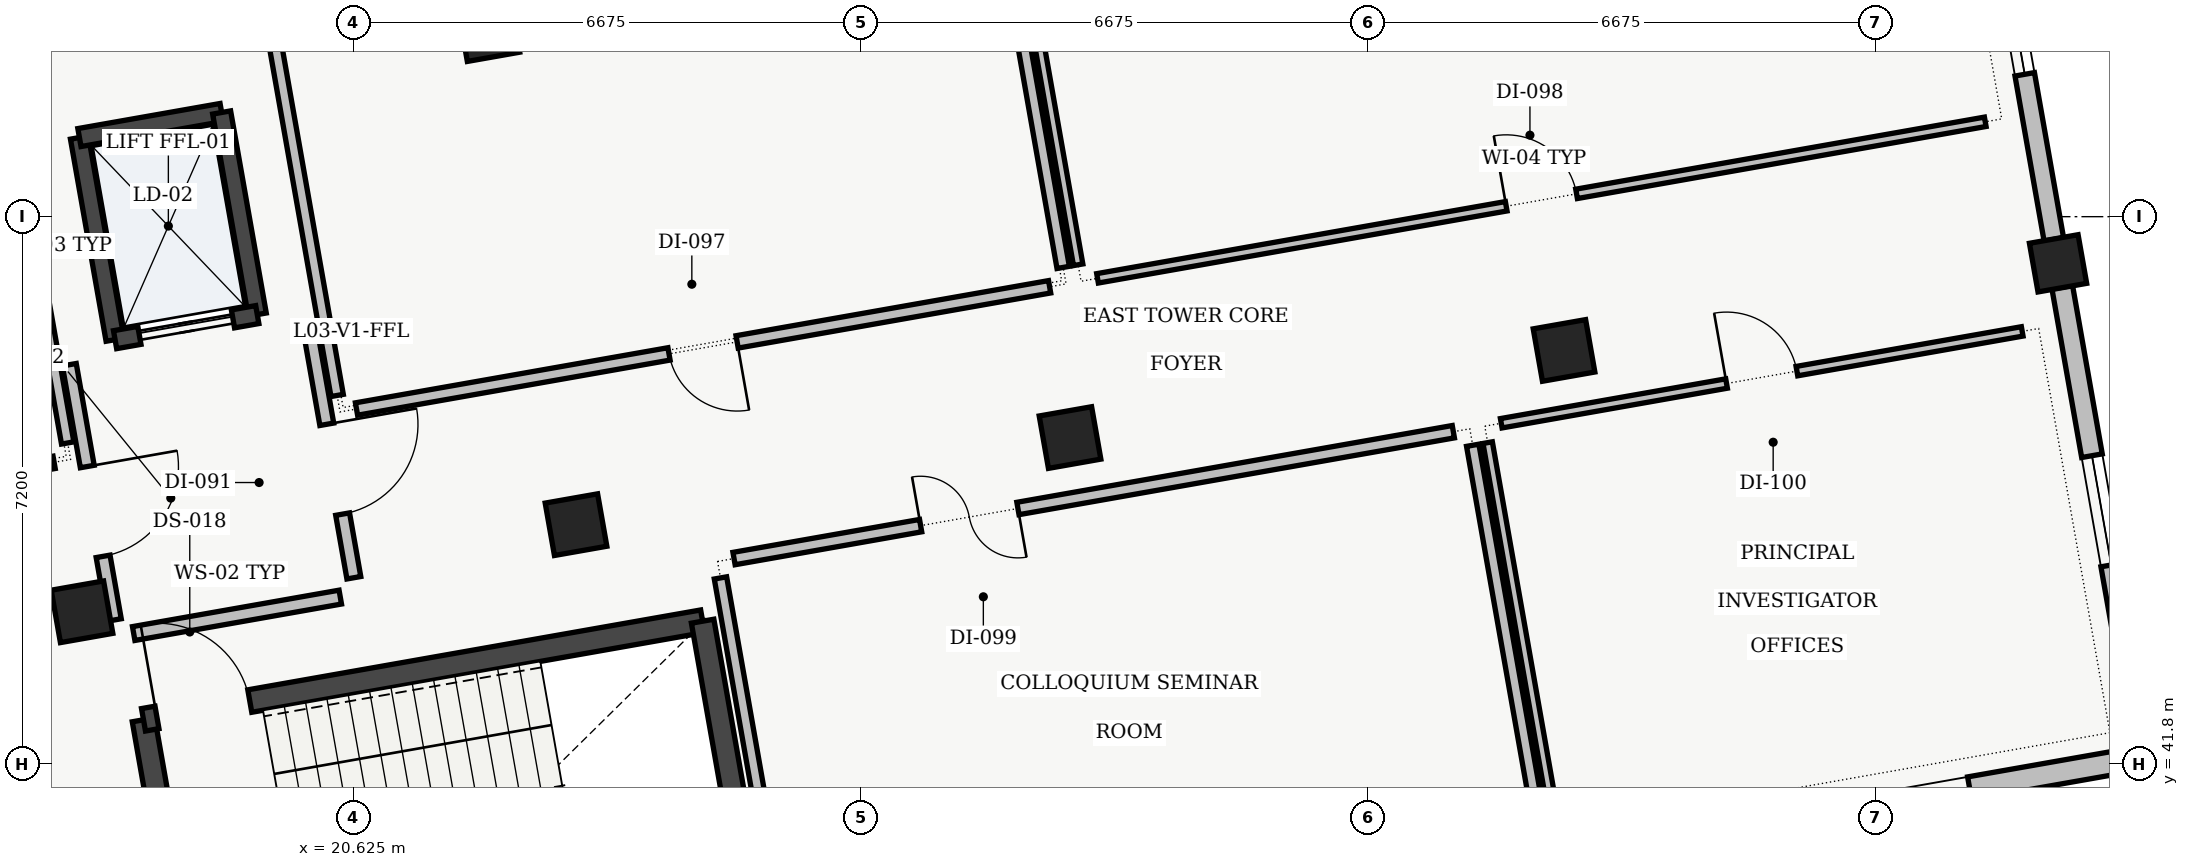
"""IFC4 building model, lengths in metres.
Left out: names, types, materials, properties, quantities, classifications, styles, units other than length and angle.
Written with IfcOpenShell. Run it as: python <this file> out.ifc"""

import sys

from ifc_helpers import new_model, si_unit, direction, frame, frame_2d, origin, origin_2d, place, context, subcontext, project, spatial, rectangle, extrude, element, fill, save


model = new_model("IFC4")
c1 = context("Model", 3, precision=1e-05, world=origin(), true_north=direction((0.0, 1.0)))
c2 = subcontext(c1, "Body", "Model", "MODEL_VIEW")
j1 = project(units=[si_unit("LENGTHUNIT", "METRE"), si_unit("PLANEANGLEUNIT", "RADIAN")], contexts=[c1])
p1 = place(None, origin())
s1 = spatial("IfcSite", under=j1, at=p1, CompositionType="ELEMENT")
p2 = place(p1, origin())
s2 = spatial("IfcBuilding", under=s1, at=p2, CompositionType="ELEMENT")
p3 = place(p2, frame((0.0, 0.0, 14.1)))
s3 = spatial("IfcBuildingStorey", under=s2, at=p3, CompositionType="ELEMENT", Elevation=14.1)
for number, where, z_axis, x_axis in (
    (1, (17.053, 43.802, 0.0), (0.0, 0.0, 1.0), (0.985, 0.174, 0.0)),
    (2, (23.553, 44.948, 0.0), (0.0, 0.0, 1.0), (0.985, 0.174, 0.0)),
    (3, (22.407, 51.448, 0.0), (0.0, 0.0, 1.0), (0.985, 0.174, 0.0)),
    (4, (30.053, 46.094, 0.0), (0.0, 0.0, 1.0), (0.985, 0.174, 0.0)),
    (5, (36.552, 47.24, 0.0), (0.0, 0.0, 1.0), (0.985, 0.174, 0.0)),
):
    element("IfcColumn", number, at=place(p3, frame(where, z_axis=z_axis, x_axis=x_axis)), inside=s3, PredefinedType="COLUMN", context=c2, shape_type="SweptSolid", body=[
        extrude(rectangle(XDim=0.7, YDim=0.7, at=origin_2d()), origin(), (0.0, 0.0, 1.0), 4.31),
    ])
p4 = place(p3, frame((43.052, 48.386, 0.0), z_axis=(0.0, 0.0, 1.0), x_axis=(0.984807753012, 0.173648177667, 0.0)))
e6 = element("IfcColumn", 6, at=p4, inside=s3, PredefinedType="COLUMN", context=c2, shape_type="SweptSolid", body=[
    extrude(rectangle(XDim=0.65, YDim=0.65, at=origin_2d()), origin(), (0.0, 0.0, 1.0), 4.31),
])
p5 = place(p3, frame((41.962, 54.571, 0.0), z_axis=(0.0, 0.0, 1.0), x_axis=(0.173645120828, -0.98480829201, 0.0)))
e7 = element("IfcWall", 7, at=p5, inside=s3, PredefinedType="STANDARD", context=c2, shape_type="SweptSolid", body=[
    extrude(rectangle(XDim=5.96, YDim=0.26, at=frame_2d((2.98, 0.0))), origin(), (0.0, 0.0, 1.0), 3.795),
])
p6 = place(p5, frame((2.205, 0.0, 0.95)))
e8 = element("IfcOpeningElement", 8, at=p6, cuts=e7, PredefinedType="OPENING", context=c2, shape_type="SweptSolid", body=[
    extrude(rectangle(XDim=1.55, YDim=1.46, at=frame_2d((0.775, 0.73))), frame((0.0, 0.13, 0.0), z_axis=(0.0, -1.0, 0.0), x_axis=(1.0, 0.0, 0.0)), (0.0, 0.0, 1.0), 0.26),
])
p7 = place(p3, frame((43.108, 48.071, 0.0), z_axis=(0.0, 0.0, 1.0), x_axis=(0.173645120828, -0.98480829201, 0.0)))
e9 = element("IfcWall", 9, at=p7, inside=s3, PredefinedType="STANDARD", context=c2, shape_type="SweptSolid", body=[
    extrude(rectangle(XDim=5.96, YDim=0.275, at=frame_2d((2.98, 0.0))), origin(), (0.0, 0.0, 1.0), 3.795),
])
p8 = place(p7, frame((2.25, 0.0, 0.95)))
e10 = element("IfcOpeningElement", 10, at=p8, cuts=e9, PredefinedType="OPENING", context=c2, shape_type="SweptSolid", body=[
    extrude(rectangle(XDim=1.46, YDim=1.44, at=frame_2d((0.73, 0.72))), frame((0.0, 0.137, 0.0), z_axis=(0.0, -1.0, 0.0), x_axis=(1.0, 0.0, 0.0)), (0.0, 0.0, 1.0), 0.275),
])
p9 = place(p3, frame((43.883, 41.831, 0.0), z_axis=(0.0, 0.0, 1.0), x_axis=(-0.98480829201, -0.173645120828, 0.0)))
e11 = element("IfcWall", 11, at=p9, inside=s3, PredefinedType="STANDARD", context=c2, shape_type="SweptSolid", body=[
    extrude(rectangle(XDim=5.96, YDim=0.305, at=frame_2d((2.98, 0.0))), origin(), (0.0, 0.0, 1.0), 3.795),
])
p10 = place(p9, frame((2.025, 0.0, 0.95)))
e12 = element("IfcOpeningElement", 12, at=p10, cuts=e11, PredefinedType="OPENING", context=c2, shape_type="SweptSolid", body=[
    extrude(rectangle(XDim=1.91, YDim=1.4, at=frame_2d((0.955, 0.7))), frame((0.0, 0.152, 0.0), z_axis=(0.0, -1.0, 0.0), x_axis=(1.0, 0.0, 0.0)), (0.0, 0.0, 1.0), 0.305),
])
p11 = place(p3, frame((18.567, 38.383, 0.0), z_axis=(0.0, 0.0, 1.0), x_axis=(-0.173606946886, 0.984815022221, 0.0)))
e13 = element("IfcWall", 13, at=p11, inside=s3, PredefinedType="SHEAR", context=c2, shape_type="SweptSolid", body=[
    extrude(rectangle(XDim=4.06, YDim=0.3, at=frame_2d((2.03, 0.0))), origin(), (0.0, 0.0, 1.0), 4.28),
])
p12 = place(p3, frame((17.863, 42.381, 0.0), z_axis=(0.0, 0.0, 1.0), x_axis=(0.984808225754, 0.173645496596, 0.0)))
e14 = element("IfcWall", 14, at=p12, inside=s3, PredefinedType="SHEAR", context=c2, shape_type="SweptSolid", body=[
    extrude(rectangle(XDim=7.47, YDim=0.3, at=frame_2d((3.735, 0.0))), origin(), (0.0, 0.0, 1.0), 4.28),
])
p13 = place(p12, frame((0.18, 0.0, 0.0)))
e15 = element("IfcOpeningElement", 15, at=p13, cuts=e14, PredefinedType="OPENING", context=c2, shape_type="SweptSolid", body=[
    extrude(rectangle(XDim=1.24, YDim=2.15, at=frame_2d((0.62, 1.075))), frame((0.0, 0.15, 0.0), z_axis=(0.0, -1.0, 0.0), x_axis=(1.0, 0.0, 0.0)), (0.0, 0.0, 1.0), 0.3),
])
p14 = place(p3, frame((25.219, 43.678, 0.0), z_axis=(0.0, 0.0, 1.0), x_axis=(0.173665267602, -0.984804739443, 0.0)))
e16 = element("IfcWall", 16, at=p14, inside=s3, PredefinedType="SHEAR", context=c2, shape_type="SweptSolid", body=[
    extrude(rectangle(XDim=4.06, YDim=0.3, at=frame_2d((2.03, 0.0))), origin(), (0.0, 0.0, 1.0), 4.28),
])
p15 = place(p3, frame((17.488, 47.382, 0.0), z_axis=(0.0, 0.0, 1.0), x_axis=(-0.173615102578, 0.98481358447, 0.0)))
e17 = element("IfcWall", 17, at=p15, inside=s3, PredefinedType="SHEAR", context=c2, shape_type="SweptSolid", body=[
    extrude(rectangle(XDim=2.7, YDim=0.24, at=frame_2d((1.35, 0.0))), origin(), (0.0, 0.0, 1.0), 4.28),
])
p16 = place(p3, frame((17.02, 50.041, 0.0), z_axis=(0.0, 0.0, 1.0), x_axis=(0.984815882103, 0.173602068988, 0.0)))
e18 = element("IfcWall", 18, at=p16, inside=s3, PredefinedType="SHEAR", context=c2, shape_type="SweptSolid", body=[
    extrude(rectangle(XDim=1.9, YDim=0.24, at=frame_2d((0.95, 0.0))), origin(), (0.0, 0.0, 1.0), 4.28),
])
p17 = place(p3, frame((18.891, 50.371, 0.0), z_axis=(0.0, 0.0, 1.0), x_axis=(0.173615102578, -0.98481358447, 0.0)))
e19 = element("IfcWall", 19, at=p17, inside=s3, PredefinedType="SHEAR", context=c2, shape_type="SweptSolid", body=[
    extrude(rectangle(XDim=2.7, YDim=0.24, at=frame_2d((1.35, 0.0))), origin(), (0.0, 0.0, 1.0), 4.28),
])
p18 = place(p3, frame((19.359, 47.712, 0.0), z_axis=(0.0, 0.0, 1.0), x_axis=(-0.984815882103, -0.173602068988, 0.0)))
e20 = element("IfcWall", 20, at=p18, inside=s3, PredefinedType="SHEAR", context=c2, shape_type="SweptSolid", body=[
    extrude(rectangle(XDim=1.9, YDim=0.24, at=frame_2d((0.95, 0.0))), origin(), (0.0, 0.0, 1.0), 4.28),
])
p19 = place(p18, frame((0.325, 0.0, 0.0)))
e21 = element("IfcOpeningElement", 21, at=p19, cuts=e20, PredefinedType="OPENING", context=c2, shape_type="SweptSolid", body=[
    extrude(rectangle(XDim=1.25, YDim=2.2, at=frame_2d((0.625, 1.1))), frame((0.0, 0.12, 0.0), z_axis=(0.0, -1.0, 0.0), x_axis=(1.0, 0.0, 0.0)), (0.0, 0.0, 1.0), 0.24),
])
p20 = place(p3, frame((17.733, 43.516, 0.0), z_axis=(0.0, 0.0, 1.0), x_axis=(0.984808483292, 0.173644035992, 0.0)))
e22 = element("IfcWall", 22, at=p20, inside=s3, PredefinedType="SOLIDWALL", context=c2, shape_type="SweptSolid", body=[
    extrude(rectangle(XDim=2.76, YDim=0.185, at=frame_2d((1.38, 0.0))), origin(), (0.0, 0.0, 1.0), 3.95),
])
p21 = place(p3, frame((20.63, 44.25, 0.0), z_axis=(0.0, 0.0, 1.0), x_axis=(-0.173621956536, 0.984812376145, 0.0)))
e23 = element("IfcWall", 23, at=p21, inside=s3, PredefinedType="SOLIDWALL", context=c2, shape_type="SweptSolid", body=[
    extrude(rectangle(XDim=3.41, YDim=0.185, at=frame_2d((1.705, 0.0))), origin(), (0.0, 0.0, 1.0), 3.95),
])
p22 = place(p21, frame((0.85, 0.0, 0.0)))
e24 = element("IfcOpeningElement", 24, at=p22, cuts=e23, PredefinedType="OPENING", context=c2, shape_type="SweptSolid", body=[
    extrude(rectangle(XDim=1.2, YDim=2.15, at=frame_2d((0.6, 1.075))), frame((0.0, 0.093, 0.0), z_axis=(0.0, -1.0, 0.0), x_axis=(1.0, 0.0, 0.0)), (0.0, 0.0, 1.0), 0.185),
])
p23 = place(p3, frame((16.886, 47.052, 0.0), z_axis=(0.0, 0.0, 1.0), x_axis=(0.173621956536, -0.984812376145, 0.0)))
e25 = element("IfcWall", 25, at=p23, inside=s3, PredefinedType="SOLIDWALL", context=c2, shape_type="SweptSolid", body=[
    extrude(rectangle(XDim=3.41, YDim=0.185, at=frame_2d((1.705, 0.0))), origin(), (0.0, 0.0, 1.0), 3.95),
])
p24 = place(p23, frame((1.36, 0.0, 0.0)))
e26 = element("IfcOpeningElement", 26, at=p24, cuts=e25, PredefinedType="OPENING", context=c2, shape_type="SweptSolid", body=[
    extrude(rectangle(XDim=1.2, YDim=2.15, at=frame_2d((0.6, 1.075))), frame((0.0, 0.093, 0.0), z_axis=(0.0, -1.0, 0.0), x_axis=(1.0, 0.0, 0.0)), (0.0, 0.0, 1.0), 0.185),
])
p25 = place(p3, frame((12.59, 45.046, 0.0), z_axis=(0.0, 0.0, 1.0), x_axis=(0.984805411783, 0.173661454915, 0.0)))
e27 = element("IfcWall", 27, at=p25, inside=s3, PredefinedType="PARTITIONING", context=c2, shape_type="SweptSolid", body=[
    extrude(rectangle(XDim=4.16, YDim=0.165, at=frame_2d((2.08, 0.0))), origin(), (0.0, 0.0, 1.0), 3.895),
])
p26 = place(p25, frame((1.28, 0.0, 0.0)))
e28 = element("IfcOpeningElement", 28, at=p26, cuts=e27, PredefinedType="OPENING", context=c2, shape_type="SweptSolid", body=[
    extrude(rectangle(XDim=1.6, YDim=2.06, at=frame_2d((0.8, 1.03))), frame((0.0, 0.083, 0.0), z_axis=(0.0, -1.0, 0.0), x_axis=(1.0, 0.0, 0.0)), (0.0, 0.0, 1.0), 0.165),
])
p27 = place(p3, frame((16.865, 46.023, 0.0), z_axis=(0.0, 0.0, 1.0), x_axis=(-0.173632075677, 0.984810592092, 0.0)))
e29 = element("IfcWall", 29, at=p27, inside=s3, PredefinedType="PARTITIONING", context=c2, shape_type="SweptSolid", body=[
    extrude(rectangle(XDim=10.36, YDim=0.165, at=frame_2d((5.18, 0.0))), origin(), (0.0, 0.0, 1.0), 3.695),
])
p28 = place(p3, frame((20.665, 46.469, 0.0), z_axis=(0.0, 0.0, 1.0), x_axis=(0.984804784872, 0.173665009985, 0.0)))
e30 = element("IfcWall", 30, at=p28, inside=s3, PredefinedType="PARTITIONING", context=c2, shape_type="SweptSolid", body=[
    extrude(rectangle(XDim=9.26, YDim=0.165, at=frame_2d((4.63, 0.0))), origin(), (0.0, 0.0, 1.0), 3.895),
])
p29 = place(p28, frame((4.175, 0.0, 0.0)))
e31 = element("IfcOpeningElement", 31, at=p29, cuts=e30, PredefinedType="OPENING", context=c2, shape_type="SweptSolid", body=[
    extrude(rectangle(XDim=0.91, YDim=2.08, at=frame_2d((0.455, 1.04))), frame((0.0, 0.083, 0.0), z_axis=(0.0, -1.0, 0.0), x_axis=(1.0, 0.0, 0.0)), (0.0, 0.0, 1.0), 0.165),
])
p30 = place(p3, frame((29.963, 48.333, 0.0), z_axis=(0.0, 0.0, 1.0), x_axis=(-0.173658960975, 0.984805851563, 0.0)))
e32 = element("IfcWall", 32, at=p30, inside=s3, PredefinedType="PARTITIONING", context=c2, shape_type="SweptSolid", body=[
    extrude(rectangle(XDim=10.36, YDim=0.165, at=frame_2d((5.18, 0.0))), origin(), (0.0, 0.0, 1.0), 3.695),
])
p31 = place(p3, frame((18.611, 56.851, 0.0), z_axis=(0.0, 0.0, 1.0), x_axis=(0.173654930775, -0.984806562233, 0.0)))
e33 = element("IfcWall", 33, at=p31, inside=s3, PredefinedType="PARTITIONING", context=c2, shape_type="SweptSolid", body=[
    extrude(rectangle(XDim=10.36, YDim=0.165, at=frame_2d((5.18, 0.0))), origin(), (0.0, 0.0, 1.0), 3.95),
])
p32 = place(p3, frame((30.415, 48.189, 0.0), z_axis=(0.0, 0.0, 1.0), x_axis=(0.984810073067, 0.173635019467, 0.0)))
e34 = element("IfcWall", 34, at=p32, inside=s3, PredefinedType="PARTITIONING", context=c2, shape_type="SweptSolid", body=[
    extrude(rectangle(XDim=11.86, YDim=0.125, at=frame_2d((5.93, 0.0))), origin(), (0.0, 0.0, 1.0), 3.95),
])
p33 = place(p32, frame((5.46, 0.0, 0.0)))
e35 = element("IfcOpeningElement", 35, at=p33, cuts=e34, PredefinedType="OPENING", context=c2, shape_type="SweptSolid", body=[
    extrude(rectangle(XDim=0.94, YDim=2.12, at=frame_2d((0.47, 1.06))), frame((0.0, 0.062, 0.0), z_axis=(0.0, -1.0, 0.0), x_axis=(1.0, 0.0, 0.0)), (0.0, 0.0, 1.0), 0.125),
])
p34 = place(p3, frame((28.361, 58.57, 0.0), z_axis=(0.0, 0.0, 1.0), x_axis=(0.173632075677, -0.984810592092, 0.0)))
e36 = element("IfcWall", 36, at=p34, inside=s3, PredefinedType="PARTITIONING", context=c2, shape_type="SweptSolid", body=[
    extrude(rectangle(XDim=10.36, YDim=0.125, at=frame_2d((5.18, 0.0))), origin(), (0.0, 0.0, 1.0), 3.95),
])
p35 = place(p3, frame((36.212, 41.108, 0.0), z_axis=(0.0, 0.0, 1.0), x_axis=(-0.173611232021, 0.984814266812, 0.0)))
e37 = element("IfcWall", 37, at=p35, inside=s3, PredefinedType="PARTITIONING", context=c2, shape_type="SweptSolid", body=[
    extrude(rectangle(XDim=4.96, YDim=0.165, at=frame_2d((2.48, 0.0))), origin(), (0.0, 0.0, 1.0), 3.95),
])
p36 = place(p3, frame((35.096, 46.171, 0.0), z_axis=(0.0, 0.0, 1.0), x_axis=(-0.98480912325, -0.173640406486, 0.0)))
e38 = element("IfcWall", 38, at=p36, inside=s3, PredefinedType="PARTITIONING", context=c2, shape_type="SweptSolid", body=[
    extrude(rectangle(XDim=9.61, YDim=0.165, at=frame_2d((4.805, 0.0))), origin(), (0.0, 0.0, 1.0), 3.95),
])
p37 = place(p36, frame((5.817, 0.0, 0.0)))
e39 = element("IfcOpeningElement", 39, at=p37, cuts=e38, PredefinedType="OPENING", context=c2, shape_type="SweptSolid", body=[
    extrude(rectangle(XDim=1.3, YDim=2.18, at=frame_2d((0.65, 1.09))), frame((0.0, 0.083, 0.0), z_axis=(0.0, -1.0, 0.0), x_axis=(1.0, 0.0, 0.0)), (0.0, 0.0, 1.0), 0.165),
])
p38 = place(p3, frame((25.454, 44.247, 0.0), z_axis=(0.0, 0.0, 1.0), x_axis=(0.173658971256, -0.98480584975, 0.0)))
e40 = element("IfcWall", 40, at=p38, inside=s3, PredefinedType="PARTITIONING", context=c2, shape_type="SweptSolid", body=[
    extrude(rectangle(XDim=4.96, YDim=0.165, at=frame_2d((2.48, 0.0))), origin(), (0.0, 0.0, 1.0), 3.95),
])
p39 = place(p3, frame((42.581, 47.491, 0.0), z_axis=(0.0, 0.0, 1.0), x_axis=(-0.984804033539, -0.173669270527, 0.0)))
e41 = element("IfcWall", 41, at=p39, inside=s3, PredefinedType="PARTITIONING", context=c2, shape_type="SweptSolid", body=[
    extrude(rectangle(XDim=6.96, YDim=0.125, at=frame_2d((3.48, 0.0))), origin(), (0.0, 0.0, 1.0), 3.95),
])
p40 = place(p39, frame((3.01, 0.0, 0.0)))
e42 = element("IfcOpeningElement", 42, at=p40, cuts=e41, PredefinedType="OPENING", context=c2, shape_type="SweptSolid", body=[
    extrude(rectangle(XDim=0.94, YDim=2.12, at=frame_2d((0.47, 1.06))), frame((0.0, 0.062, 0.0), z_axis=(0.0, -1.0, 0.0), x_axis=(1.0, 0.0, 0.0)), (0.0, 0.0, 1.0), 0.125),
])
p41 = place(p3, frame((35.548, 46.027, 0.0), z_axis=(0.0, 0.0, 1.0), x_axis=(0.173650553511, -0.984807334084, 0.0)))
e43 = element("IfcWall", 43, at=p41, inside=s3, PredefinedType="PARTITIONING", context=c2, shape_type="SweptSolid", body=[
    extrude(rectangle(XDim=4.96, YDim=0.125, at=frame_2d((2.48, 0.0))), origin(), (0.0, 0.0, 1.0), 3.95),
])
p42 = place(p6, origin())
e44 = element("IfcWindow", 44, at=p42, inside=s3, PartitioningType="SINGLE_PANEL", PredefinedType="WINDOW", context=c2, shape_type="SweptSolid", body=[
    extrude(rectangle(XDim=1.55, YDim=1.46, at=frame_2d((0.775, 0.73))), frame((0.0, 0.03, 0.0), z_axis=(0.0, -1.0, 0.0), x_axis=(1.0, 0.0, 0.0)), (0.0, 0.0, 1.0), 0.06),
])
fill(e8, e44)
p43 = place(p8, origin())
e45 = element("IfcWindow", 45, at=p43, inside=s3, PartitioningType="SINGLE_PANEL", PredefinedType="WINDOW", context=c2, shape_type="SweptSolid", body=[
    extrude(rectangle(XDim=1.46, YDim=1.44, at=frame_2d((0.73, 0.72))), frame((0.0, 0.03, 0.0), z_axis=(0.0, -1.0, 0.0), x_axis=(1.0, 0.0, 0.0)), (0.0, 0.0, 1.0), 0.06),
])
fill(e10, e45)
p44 = place(p10, origin())
e46 = element("IfcWindow", 46, at=p44, inside=s3, PartitioningType="SINGLE_PANEL", PredefinedType="WINDOW", context=c2, shape_type="SweptSolid", body=[
    extrude(rectangle(XDim=1.91, YDim=1.4, at=frame_2d((0.955, 0.7))), frame((0.0, 0.03, 0.0), z_axis=(0.0, -1.0, 0.0), x_axis=(1.0, 0.0, 0.0)), (0.0, 0.0, 1.0), 0.06),
])
fill(e12, e46)
p45 = place(p13, origin())
e47 = element("IfcDoor", 47, at=p45, inside=s3, OperationType="SINGLE_SWING_LEFT", PredefinedType="DOOR", context=c2, shape_type="SweptSolid", body=[
    extrude(rectangle(XDim=1.24, YDim=2.15, at=frame_2d((0.62, 1.075))), frame((0.0, 0.025, 0.0), z_axis=(0.0, -1.0, 0.0), x_axis=(1.0, 0.0, 0.0)), (0.0, 0.0, 1.0), 0.05),
])
fill(e15, e47)
p46 = place(p19, origin())
e48 = element("IfcDoor", 48, at=p46, inside=s3, OperationType="SLIDING_TO_RIGHT", PredefinedType="DOOR", context=c2, shape_type="SweptSolid", body=[
    extrude(rectangle(XDim=1.25, YDim=2.2, at=frame_2d((0.625, 1.1))), frame((0.0, 0.025, 0.0), z_axis=(0.0, -1.0, 0.0), x_axis=(1.0, 0.0, 0.0)), (0.0, 0.0, 1.0), 0.05),
])
fill(e21, e48)
p47 = place(p22, origin())
e49 = element("IfcDoor", 49, at=p47, inside=s3, OperationType="SINGLE_SWING_RIGHT", PredefinedType="DOOR", context=c2, shape_type="SweptSolid", body=[
    extrude(rectangle(XDim=1.2, YDim=2.15, at=frame_2d((0.6, 1.075))), frame((0.0, 0.025, 0.0), z_axis=(0.0, -1.0, 0.0), x_axis=(1.0, 0.0, 0.0)), (0.0, 0.0, 1.0), 0.05),
])
fill(e24, e49)
p48 = place(p24, origin())
e50 = element("IfcDoor", 50, at=p48, inside=s3, OperationType="SINGLE_SWING_LEFT", PredefinedType="DOOR", context=c2, shape_type="SweptSolid", body=[
    extrude(rectangle(XDim=1.2, YDim=2.15, at=frame_2d((0.6, 1.075))), frame((0.0, 0.025, 0.0), z_axis=(0.0, -1.0, 0.0), x_axis=(1.0, 0.0, 0.0)), (0.0, 0.0, 1.0), 0.05),
])
fill(e26, e50)
p49 = place(p29, origin())
e51 = element("IfcDoor", 51, at=p49, inside=s3, OperationType="SINGLE_SWING_RIGHT", PredefinedType="DOOR", context=c2, shape_type="SweptSolid", body=[
    extrude(rectangle(XDim=0.91, YDim=2.08, at=frame_2d((0.455, 1.04))), frame((0.0, 0.025, 0.0), z_axis=(0.0, -1.0, 0.0), x_axis=(1.0, 0.0, 0.0)), (0.0, 0.0, 1.0), 0.05),
])
fill(e31, e51)
p50 = place(p33, origin())
e52 = element("IfcDoor", 52, at=p50, inside=s3, OperationType="SINGLE_SWING_LEFT", PredefinedType="DOOR", context=c2, shape_type="SweptSolid", body=[
    extrude(rectangle(XDim=0.94, YDim=2.12, at=frame_2d((0.47, 1.06))), frame((0.0, 0.025, 0.0), z_axis=(0.0, -1.0, 0.0), x_axis=(1.0, 0.0, 0.0)), (0.0, 0.0, 1.0), 0.05),
])
fill(e35, e52)
p51 = place(p37, origin())
e53 = element("IfcDoor", 53, at=p51, inside=s3, OperationType="DOUBLE_DOOR_SINGLE_SWING", PredefinedType="DOOR", context=c2, shape_type="SweptSolid", body=[
    extrude(rectangle(XDim=1.3, YDim=2.18, at=frame_2d((0.65, 1.09))), frame((0.0, 0.025, 0.0), z_axis=(0.0, -1.0, 0.0), x_axis=(1.0, 0.0, 0.0)), (0.0, 0.0, 1.0), 0.05),
])
fill(e39, e53)
p52 = place(p40, origin())
e54 = element("IfcDoor", 54, at=p52, inside=s3, OperationType="SINGLE_SWING_RIGHT", PredefinedType="DOOR", context=c2, shape_type="SweptSolid", body=[
    extrude(rectangle(XDim=0.94, YDim=2.12, at=frame_2d((0.47, 1.06))), frame((0.0, 0.025, 0.0), z_axis=(0.0, -1.0, 0.0), x_axis=(1.0, 0.0, 0.0)), (0.0, 0.0, 1.0), 0.05),
])
fill(e42, e54)
save(model, sys.argv[1])
